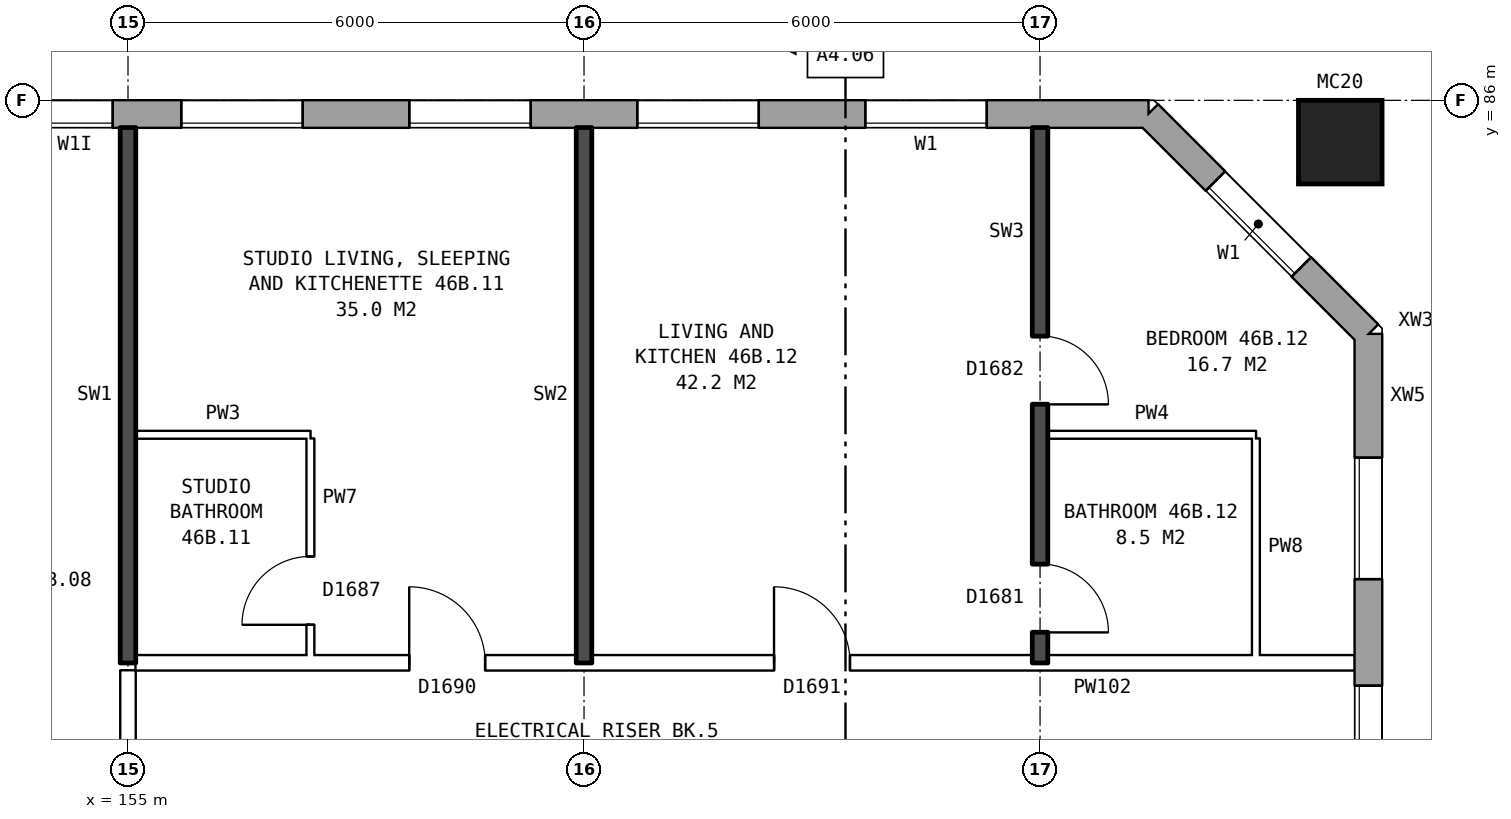
"""IFC4 building model, lengths in metres.
Left out: names, types, materials, properties, quantities, classifications, styles, units other than length and angle.
Written with IfcOpenShell. Run it as: python <this file> out.ifc"""

import sys

from ifc_helpers import new_model, si_unit, direction, frame, frame_2d, origin, origin_2d, place, context, subcontext, project, spatial, rectangle, hollow_rectangle, extrude, element, fill, save


model = new_model("IFC4")
c1 = context("Model", 3, precision=1e-05, world=origin(), true_north=direction((0.0, 1.0)))
c2 = subcontext(c1, "Body", "Model", "MODEL_VIEW")
j1 = project(units=[si_unit("LENGTHUNIT", "METRE"), si_unit("PLANEANGLEUNIT", "RADIAN")], contexts=[c1])
p1 = place(None, origin())
s1 = spatial("IfcSite", under=j1, at=p1, CompositionType="ELEMENT")
p2 = place(p1, origin())
s2 = spatial("IfcBuilding", under=s1, at=p2, CompositionType="ELEMENT")
p3 = place(p2, frame((0.0, 0.0, 164.0)))
s3 = spatial("IfcBuildingStorey", under=s2, at=p3, CompositionType="ELEMENT", Elevation=164.0)
p4 = place(p3, frame((170.95, 85.45, 0.0), z_axis=(0.0, 0.0, 1.0), x_axis=(1.0, 0.0, 0.0)))
e1 = element("IfcColumn", 1, at=p4, inside=s3, PredefinedType="COLUMN", context=c2, shape_type="SweptSolid", body=[
    extrude(hollow_rectangle(XDim=1.1, YDim=1.1, WallThickness=0.06, at=origin_2d()), origin(), (0.0, 0.0, 1.0), 3.1),
])
p5 = place(p3, frame((171.32, 57.075, 0.0), z_axis=(0.0, 0.0, 1.0), x_axis=(0.0, 1.0, 0.0)))
e2 = element("IfcWall", 2, at=p5, inside=s3, PredefinedType="STANDARD", context=c2, shape_type="SweptSolid", body=[
    extrude(rectangle(XDim=25.851, YDim=0.36, at=frame_2d((12.925, 0.0))), origin(), (0.0, 0.0, 1.0), 2.85),
])
p6 = place(p5, frame((1.625, 0.0, 0.8)))
e3 = element("IfcOpeningElement", 3, at=p6, cuts=e2, PredefinedType="OPENING", context=c2, shape_type="SweptSolid", body=[
    extrude(rectangle(XDim=1.6, YDim=1.8, at=frame_2d((0.8, 0.9))), frame((0.0, 0.19, 0.0), z_axis=(0.0, -1.0, 0.0), x_axis=(1.0, 0.0, 0.0)), (0.0, 0.0, 1.0), 0.38),
])
p7 = place(p5, frame((4.625, 0.0, 0.8)))
e4 = element("IfcOpeningElement", 4, at=p7, cuts=e2, PredefinedType="OPENING", context=c2, shape_type="SweptSolid", body=[
    extrude(rectangle(XDim=1.6, YDim=1.8, at=frame_2d((0.8, 0.9))), frame((0.0, 0.19, 0.0), z_axis=(0.0, -1.0, 0.0), x_axis=(1.0, 0.0, 0.0)), (0.0, 0.0, 1.0), 0.38),
])
p8 = place(p5, frame((7.625, 0.0, 0.8)))
e5 = element("IfcOpeningElement", 5, at=p8, cuts=e2, PredefinedType="OPENING", context=c2, shape_type="SweptSolid", body=[
    extrude(rectangle(XDim=1.6, YDim=1.8, at=frame_2d((0.8, 0.9))), frame((0.0, 0.19, 0.0), z_axis=(0.0, -1.0, 0.0), x_axis=(1.0, 0.0, 0.0)), (0.0, 0.0, 1.0), 0.38),
])
p9 = place(p5, frame((10.625, 0.0, 0.8)))
e6 = element("IfcOpeningElement", 6, at=p9, cuts=e2, PredefinedType="OPENING", context=c2, shape_type="SweptSolid", body=[
    extrude(rectangle(XDim=1.6, YDim=1.8, at=frame_2d((0.8, 0.9))), frame((0.0, 0.19, 0.0), z_axis=(0.0, -1.0, 0.0), x_axis=(1.0, 0.0, 0.0)), (0.0, 0.0, 1.0), 0.38),
])
p10 = place(p5, frame((13.625, 0.0, 0.8)))
e7 = element("IfcOpeningElement", 7, at=p10, cuts=e2, PredefinedType="OPENING", context=c2, shape_type="SweptSolid", body=[
    extrude(rectangle(XDim=1.6, YDim=1.8, at=frame_2d((0.8, 0.9))), frame((0.0, 0.19, 0.0), z_axis=(0.0, -1.0, 0.0), x_axis=(1.0, 0.0, 0.0)), (0.0, 0.0, 1.0), 0.38),
])
p11 = place(p5, frame((16.625, 0.0, 0.8)))
e8 = element("IfcOpeningElement", 8, at=p11, cuts=e2, PredefinedType="OPENING", context=c2, shape_type="SweptSolid", body=[
    extrude(rectangle(XDim=1.6, YDim=1.8, at=frame_2d((0.8, 0.9))), frame((0.0, 0.19, 0.0), z_axis=(0.0, -1.0, 0.0), x_axis=(1.0, 0.0, 0.0)), (0.0, 0.0, 1.0), 0.38),
])
p12 = place(p5, frame((19.625, 0.0, 0.8)))
e9 = element("IfcOpeningElement", 9, at=p12, cuts=e2, PredefinedType="OPENING", context=c2, shape_type="SweptSolid", body=[
    extrude(rectangle(XDim=1.6, YDim=1.8, at=frame_2d((0.8, 0.9))), frame((0.0, 0.19, 0.0), z_axis=(0.0, -1.0, 0.0), x_axis=(1.0, 0.0, 0.0)), (0.0, 0.0, 1.0), 0.38),
])
p13 = place(p5, frame((22.625, 0.0, 0.8)))
e10 = element("IfcOpeningElement", 10, at=p13, cuts=e2, PredefinedType="OPENING", context=c2, shape_type="SweptSolid", body=[
    extrude(rectangle(XDim=1.6, YDim=1.8, at=frame_2d((0.8, 0.9))), frame((0.0, 0.19, 0.0), z_axis=(0.0, -1.0, 0.0), x_axis=(1.0, 0.0, 0.0)), (0.0, 0.0, 1.0), 0.38),
])
p14 = place(p3, frame((171.32, 82.925, 0.0), z_axis=(0.0, 0.0, 1.0), x_axis=(-0.707106781187, 0.707106781187, 0.0)))
e11 = element("IfcWall", 11, at=p14, inside=s3, PredefinedType="STANDARD", context=c2, shape_type="SweptSolid", body=[
    extrude(rectangle(XDim=4.094, YDim=0.36, at=frame_2d((2.047, 0.0))), origin(), (0.0, 0.0, 1.0), 2.85),
])
p15 = place(p14, frame((1.247, 0.0, 0.8)))
e12 = element("IfcOpeningElement", 12, at=p15, cuts=e11, PredefinedType="OPENING", context=c2, shape_type="SweptSolid", body=[
    extrude(rectangle(XDim=1.6, YDim=1.8, at=frame_2d((0.8, 0.9))), frame((0.0, 0.19, 0.0), z_axis=(0.0, -1.0, 0.0), x_axis=(1.0, 0.0, 0.0)), (0.0, 0.0, 1.0), 0.38),
])
p16 = place(p3, frame((168.425, 85.82, 0.0), z_axis=(0.0, 0.0, 1.0), x_axis=(-1.0, 0.0, 0.0)))
e13 = element("IfcWall", 13, at=p16, inside=s3, PredefinedType="STANDARD", context=c2, shape_type="SweptSolid", body=[
    extrude(rectangle(XDim=34.351, YDim=0.36, at=frame_2d((17.175, 0.0))), origin(), (0.0, 0.0, 1.0), 2.85),
])
p17 = place(p16, frame((2.125, 0.0, 0.8)))
e14 = element("IfcOpeningElement", 14, at=p17, cuts=e13, PredefinedType="OPENING", context=c2, shape_type="SweptSolid", body=[
    extrude(rectangle(XDim=1.6, YDim=1.8, at=frame_2d((0.8, 0.9))), frame((0.0, 0.19, 0.0), z_axis=(0.0, -1.0, 0.0), x_axis=(1.0, 0.0, 0.0)), (0.0, 0.0, 1.0), 0.38),
])
p18 = place(p16, frame((5.125, 0.0, 0.8)))
e15 = element("IfcOpeningElement", 15, at=p18, cuts=e13, PredefinedType="OPENING", context=c2, shape_type="SweptSolid", body=[
    extrude(rectangle(XDim=1.6, YDim=1.8, at=frame_2d((0.8, 0.9))), frame((0.0, 0.19, 0.0), z_axis=(0.0, -1.0, 0.0), x_axis=(1.0, 0.0, 0.0)), (0.0, 0.0, 1.0), 0.38),
])
p19 = place(p16, frame((8.125, 0.0, 0.8)))
e16 = element("IfcOpeningElement", 16, at=p19, cuts=e13, PredefinedType="OPENING", context=c2, shape_type="SweptSolid", body=[
    extrude(rectangle(XDim=1.6, YDim=1.8, at=frame_2d((0.8, 0.9))), frame((0.0, 0.19, 0.0), z_axis=(0.0, -1.0, 0.0), x_axis=(1.0, 0.0, 0.0)), (0.0, 0.0, 1.0), 0.38),
])
p20 = place(p16, frame((11.125, 0.0, 0.8)))
e17 = element("IfcOpeningElement", 17, at=p20, cuts=e13, PredefinedType="OPENING", context=c2, shape_type="SweptSolid", body=[
    extrude(rectangle(XDim=1.6, YDim=1.8, at=frame_2d((0.8, 0.9))), frame((0.0, 0.19, 0.0), z_axis=(0.0, -1.0, 0.0), x_axis=(1.0, 0.0, 0.0)), (0.0, 0.0, 1.0), 0.38),
])
p21 = place(p16, frame((13.625, 0.0, 0.9)))
e18 = element("IfcOpeningElement", 18, at=p21, cuts=e13, PredefinedType="OPENING", context=c2, shape_type="SweptSolid", body=[
    extrude(rectangle(XDim=1.0, YDim=1.5, at=frame_2d((0.5, 0.75))), frame((0.0, 0.19, 0.0), z_axis=(0.0, -1.0, 0.0), x_axis=(1.0, 0.0, 0.0)), (0.0, 0.0, 1.0), 0.38),
])
p22 = place(p16, frame((16.575, 0.0, 0.25)))
e19 = element("IfcOpeningElement", 19, at=p22, cuts=e13, PredefinedType="OPENING", context=c2, shape_type="SweptSolid", body=[
    extrude(rectangle(XDim=1.4, YDim=1.2, at=frame_2d((0.7, 0.6))), frame((0.0, 0.19, 0.0), z_axis=(0.0, -1.0, 0.0), x_axis=(1.0, 0.0, 0.0)), (0.0, 0.0, 1.0), 0.38),
])
p23 = place(p16, frame((20.125, 0.0, 0.8)))
e20 = element("IfcOpeningElement", 20, at=p23, cuts=e13, PredefinedType="OPENING", context=c2, shape_type="SweptSolid", body=[
    extrude(rectangle(XDim=1.6, YDim=1.8, at=frame_2d((0.8, 0.9))), frame((0.0, 0.19, 0.0), z_axis=(0.0, -1.0, 0.0), x_axis=(1.0, 0.0, 0.0)), (0.0, 0.0, 1.0), 0.38),
])
p24 = place(p16, frame((23.125, 0.0, 0.8)))
e21 = element("IfcOpeningElement", 21, at=p24, cuts=e13, PredefinedType="OPENING", context=c2, shape_type="SweptSolid", body=[
    extrude(rectangle(XDim=1.6, YDim=1.8, at=frame_2d((0.8, 0.9))), frame((0.0, 0.19, 0.0), z_axis=(0.0, -1.0, 0.0), x_axis=(1.0, 0.0, 0.0)), (0.0, 0.0, 1.0), 0.38),
])
p25 = place(p16, frame((26.125, 0.0, 0.8)))
e22 = element("IfcOpeningElement", 22, at=p25, cuts=e13, PredefinedType="OPENING", context=c2, shape_type="SweptSolid", body=[
    extrude(rectangle(XDim=1.6, YDim=1.8, at=frame_2d((0.8, 0.9))), frame((0.0, 0.19, 0.0), z_axis=(0.0, -1.0, 0.0), x_axis=(1.0, 0.0, 0.0)), (0.0, 0.0, 1.0), 0.38),
])
p26 = place(p16, frame((29.125, 0.0, 0.8)))
e23 = element("IfcOpeningElement", 23, at=p26, cuts=e13, PredefinedType="OPENING", context=c2, shape_type="SweptSolid", body=[
    extrude(rectangle(XDim=1.6, YDim=1.8, at=frame_2d((0.8, 0.9))), frame((0.0, 0.19, 0.0), z_axis=(0.0, -1.0, 0.0), x_axis=(1.0, 0.0, 0.0)), (0.0, 0.0, 1.0), 0.38),
])
p27 = place(p16, frame((32.125, 0.0, 0.8)))
e24 = element("IfcOpeningElement", 24, at=p27, cuts=e13, PredefinedType="OPENING", context=c2, shape_type="SweptSolid", body=[
    extrude(rectangle(XDim=1.6, YDim=1.8, at=frame_2d((0.8, 0.9))), frame((0.0, 0.19, 0.0), z_axis=(0.0, -1.0, 0.0), x_axis=(1.0, 0.0, 0.0)), (0.0, 0.0, 1.0), 0.38),
])
p28 = place(p16, frame((14.925, 0.0, 1.7)))
e25 = element("IfcOpeningElement", 25, at=p28, cuts=e13, PredefinedType="OPENING", context=c2, shape_type="SweptSolid", body=[
    extrude(rectangle(XDim=0.6, YDim=0.9, at=frame_2d((0.3, 0.45))), frame((0.0, 0.19, 0.0), z_axis=(0.0, -1.0, 0.0), x_axis=(1.0, 0.0, 0.0)), (0.0, 0.0, 1.0), 0.38),
])
p29 = place(p3, frame((155.1, 78.6, 0.0), z_axis=(0.0, 0.0, 1.0), x_axis=(1.0, 0.0, 0.0)))
e26 = element("IfcWall", 26, at=p29, inside=s3, PredefinedType="PARTITIONING", context=c2, shape_type="SweptSolid", body=[
    extrude(rectangle(XDim=16.04, YDim=0.2, at=frame_2d((8.02, 0.0))), origin(), (0.0, 0.0, 1.0), 2.85),
])
p30 = place(p29, frame((3.6, 0.0, 0.0)))
e27 = element("IfcOpeningElement", 27, at=p30, cuts=e26, PredefinedType="OPENING", context=c2, shape_type="SweptSolid", body=[
    extrude(rectangle(XDim=1.0, YDim=2.1, at=frame_2d((0.5, 1.05))), frame((0.0, 0.11, 0.0), z_axis=(0.0, -1.0, 0.0), x_axis=(1.0, 0.0, 0.0)), (0.0, 0.0, 1.0), 0.22),
])
p31 = place(p29, frame((8.4, 0.0, 0.0)))
e28 = element("IfcOpeningElement", 28, at=p31, cuts=e26, PredefinedType="OPENING", context=c2, shape_type="SweptSolid", body=[
    extrude(rectangle(XDim=1.0, YDim=2.1, at=frame_2d((0.5, 1.05))), frame((0.0, 0.11, 0.0), z_axis=(0.0, -1.0, 0.0), x_axis=(1.0, 0.0, 0.0)), (0.0, 0.0, 1.0), 0.22),
])
p32 = place(p3, frame((155.1, 81.6, 0.0), z_axis=(0.0, 0.0, 1.0), x_axis=(1.0, 0.0, 0.0)))
e29 = element("IfcWall", 29, at=p32, inside=s3, PredefinedType="PARTITIONING", context=c2, shape_type="SweptSolid", body=[
    extrude(rectangle(XDim=2.3, YDim=0.1, at=frame_2d((1.15, 0.0))), origin(), (0.0, 0.0, 1.0), 2.85),
])
p33 = place(p3, frame((167.1, 81.6, 0.0), z_axis=(0.0, 0.0, 1.0), x_axis=(1.0, 0.0, 0.0)))
e30 = element("IfcWall", 30, at=p33, inside=s3, PredefinedType="PARTITIONING", context=c2, shape_type="SweptSolid", body=[
    extrude(rectangle(XDim=2.74, YDim=0.1, at=frame_2d((1.37, 0.0))), origin(), (0.0, 0.0, 1.0), 2.85),
])
p34 = place(p3, frame((155.0, 76.3, 0.0), z_axis=(0.0, 0.0, 1.0), x_axis=(0.0, 1.0, 0.0)))
e31 = element("IfcWall", 31, at=p34, inside=s3, PredefinedType="PARTITIONING", context=c2, shape_type="SweptSolid", body=[
    extrude(rectangle(XDim=2.2, YDim=0.2, at=frame_2d((1.1, 0.0))), origin(), (0.0, 0.0, 1.0), 2.85),
])
p35 = place(p3, frame((155.0, 78.6, 0.0), z_axis=(0.0, 0.0, 1.0), x_axis=(0.0, 1.0, 0.0)))
e32 = element("IfcWall", 32, at=p35, inside=s3, PredefinedType="SOLIDWALL", context=c2, shape_type="SweptSolid", body=[
    extrude(rectangle(XDim=7.04, YDim=0.2, at=frame_2d((3.52, 0.0))), origin(), (0.0, 0.0, 1.0), 2.85),
])
p36 = place(p3, frame((157.4, 78.7, 0.0), z_axis=(0.0, 0.0, 1.0), x_axis=(0.0, 1.0, 0.0)))
e33 = element("IfcWall", 33, at=p36, inside=s3, PredefinedType="PARTITIONING", context=c2, shape_type="SweptSolid", body=[
    extrude(rectangle(XDim=2.85, YDim=0.1, at=frame_2d((1.425, 0.0))), origin(), (0.0, 0.0, 1.0), 2.85),
])
p37 = place(p36, frame((0.4, 0.0, 0.0)))
e34 = element("IfcOpeningElement", 34, at=p37, cuts=e33, PredefinedType="OPENING", context=c2, shape_type="SweptSolid", body=[
    extrude(rectangle(XDim=0.9, YDim=2.1, at=frame_2d((0.45, 1.05))), frame((0.0, 0.06, 0.0), z_axis=(0.0, -1.0, 0.0), x_axis=(1.0, 0.0, 0.0)), (0.0, 0.0, 1.0), 0.12),
])
p38 = place(p3, frame((161.0, 78.6, 0.0), z_axis=(0.0, 0.0, 1.0), x_axis=(0.0, 1.0, 0.0)))
e35 = element("IfcWall", 35, at=p38, inside=s3, PredefinedType="SOLIDWALL", context=c2, shape_type="SweptSolid", body=[
    extrude(rectangle(XDim=7.04, YDim=0.2, at=frame_2d((3.52, 0.0))), origin(), (0.0, 0.0, 1.0), 2.85),
])
p39 = place(p3, frame((167.0, 78.6, 0.0), z_axis=(0.0, 0.0, 1.0), x_axis=(0.0, 1.0, 0.0)))
e36 = element("IfcWall", 36, at=p39, inside=s3, PredefinedType="SOLIDWALL", context=c2, shape_type="SweptSolid", body=[
    extrude(rectangle(XDim=7.04, YDim=0.2, at=frame_2d((3.52, 0.0))), origin(), (0.0, 0.0, 1.0), 2.85),
])
p40 = place(p39, frame((3.4, 0.0, 0.0)))
e37 = element("IfcOpeningElement", 37, at=p40, cuts=e36, PredefinedType="OPENING", context=c2, shape_type="SweptSolid", body=[
    extrude(rectangle(XDim=0.9, YDim=2.1, at=frame_2d((0.45, 1.05))), frame((0.0, 0.11, 0.0), z_axis=(0.0, -1.0, 0.0), x_axis=(1.0, 0.0, 0.0)), (0.0, 0.0, 1.0), 0.22),
])
p41 = place(p39, frame((0.4, 0.0, 0.0)))
e38 = element("IfcOpeningElement", 38, at=p41, cuts=e36, PredefinedType="OPENING", context=c2, shape_type="SweptSolid", body=[
    extrude(rectangle(XDim=0.9, YDim=2.1, at=frame_2d((0.45, 1.05))), frame((0.0, 0.11, 0.0), z_axis=(0.0, -1.0, 0.0), x_axis=(1.0, 0.0, 0.0)), (0.0, 0.0, 1.0), 0.22),
])
p42 = place(p3, frame((169.84, 78.7, 0.0), z_axis=(0.0, 0.0, 1.0), x_axis=(0.0, 1.0, 0.0)))
e39 = element("IfcWall", 39, at=p42, inside=s3, PredefinedType="PARTITIONING", context=c2, shape_type="SweptSolid", body=[
    extrude(rectangle(XDim=2.85, YDim=0.1, at=frame_2d((1.425, 0.0))), origin(), (0.0, 0.0, 1.0), 2.85),
])
p43 = place(p12, origin())
e40 = element("IfcWindow", 40, at=p43, inside=s3, PartitioningType="SINGLE_PANEL", PredefinedType="WINDOW", context=c2, shape_type="SweptSolid", body=[
    extrude(rectangle(XDim=1.6, YDim=1.8, at=frame_2d((0.8, 0.9))), frame((0.0, 0.15, 0.0), z_axis=(0.0, -1.0, 0.0), x_axis=(1.0, 0.0, 0.0)), (0.0, 0.0, 1.0), 0.06),
])
fill(e9, e40)
p44 = place(p13, origin())
e41 = element("IfcWindow", 41, at=p44, inside=s3, PartitioningType="SINGLE_PANEL", PredefinedType="WINDOW", context=c2, shape_type="SweptSolid", body=[
    extrude(rectangle(XDim=1.6, YDim=1.8, at=frame_2d((0.8, 0.9))), frame((0.0, 0.15, 0.0), z_axis=(0.0, -1.0, 0.0), x_axis=(1.0, 0.0, 0.0)), (0.0, 0.0, 1.0), 0.06),
])
fill(e10, e41)
p45 = place(p15, origin())
e42 = element("IfcWindow", 42, at=p45, inside=s3, PartitioningType="SINGLE_PANEL", PredefinedType="WINDOW", context=c2, shape_type="SweptSolid", body=[
    extrude(rectangle(XDim=1.6, YDim=1.8, at=frame_2d((0.8, 0.9))), frame((0.0, 0.15, 0.0), z_axis=(0.0, -1.0, 0.0), x_axis=(1.0, 0.0, 0.0)), (0.0, 0.0, 1.0), 0.06),
])
fill(e12, e42)
p46 = place(p17, origin())
e43 = element("IfcWindow", 43, at=p46, inside=s3, PartitioningType="SINGLE_PANEL", PredefinedType="WINDOW", context=c2, shape_type="SweptSolid", body=[
    extrude(rectangle(XDim=1.6, YDim=1.8, at=frame_2d((0.8, 0.9))), frame((0.0, 0.15, 0.0), z_axis=(0.0, -1.0, 0.0), x_axis=(1.0, 0.0, 0.0)), (0.0, 0.0, 1.0), 0.06),
])
fill(e14, e43)
p47 = place(p18, origin())
e44 = element("IfcWindow", 44, at=p47, inside=s3, PartitioningType="SINGLE_PANEL", PredefinedType="WINDOW", context=c2, shape_type="SweptSolid", body=[
    extrude(rectangle(XDim=1.6, YDim=1.8, at=frame_2d((0.8, 0.9))), frame((0.0, 0.15, 0.0), z_axis=(0.0, -1.0, 0.0), x_axis=(1.0, 0.0, 0.0)), (0.0, 0.0, 1.0), 0.06),
])
fill(e15, e44)
p48 = place(p19, origin())
e45 = element("IfcWindow", 45, at=p48, inside=s3, PartitioningType="SINGLE_PANEL", PredefinedType="WINDOW", context=c2, shape_type="SweptSolid", body=[
    extrude(rectangle(XDim=1.6, YDim=1.8, at=frame_2d((0.8, 0.9))), frame((0.0, 0.15, 0.0), z_axis=(0.0, -1.0, 0.0), x_axis=(1.0, 0.0, 0.0)), (0.0, 0.0, 1.0), 0.06),
])
fill(e16, e45)
p49 = place(p20, origin())
e46 = element("IfcWindow", 46, at=p49, inside=s3, PartitioningType="SINGLE_PANEL", PredefinedType="WINDOW", context=c2, shape_type="SweptSolid", body=[
    extrude(rectangle(XDim=1.6, YDim=1.8, at=frame_2d((0.8, 0.9))), frame((0.0, 0.15, 0.0), z_axis=(0.0, -1.0, 0.0), x_axis=(1.0, 0.0, 0.0)), (0.0, 0.0, 1.0), 0.06),
])
fill(e17, e46)
p50 = place(p21, origin())
e47 = element("IfcWindow", 47, at=p50, inside=s3, PartitioningType="SINGLE_PANEL", PredefinedType="WINDOW", context=c2, shape_type="SweptSolid", body=[
    extrude(rectangle(XDim=1.0, YDim=1.5, at=frame_2d((0.5, 0.75))), frame((0.0, 0.15, 0.0), z_axis=(0.0, -1.0, 0.0), x_axis=(1.0, 0.0, 0.0)), (0.0, 0.0, 1.0), 0.06),
])
fill(e18, e47)
p51 = place(p30, origin())
e48 = element("IfcDoor", 48, at=p51, inside=s3, OperationType="SINGLE_SWING_LEFT", PredefinedType="DOOR", context=c2, shape_type="SweptSolid", body=[
    extrude(rectangle(XDim=1.0, YDim=2.1, at=frame_2d((0.5, 1.05))), frame((0.0, 0.025, 0.0), z_axis=(0.0, -1.0, 0.0), x_axis=(1.0, 0.0, 0.0)), (0.0, 0.0, 1.0), 0.05),
])
fill(e27, e48)
p52 = place(p37, origin())
e49 = element("IfcDoor", 49, at=p52, inside=s3, OperationType="SINGLE_SWING_LEFT", PredefinedType="DOOR", context=c2, shape_type="SweptSolid", body=[
    extrude(rectangle(XDim=0.9, YDim=2.1, at=frame_2d((0.45, 1.05))), frame((0.0, 0.025, 0.0), z_axis=(0.0, -1.0, 0.0), x_axis=(1.0, 0.0, 0.0)), (0.0, 0.0, 1.0), 0.05),
])
fill(e34, e49)
p53 = place(p40, frame((0.9, 0.0, 0.0), z_axis=(0.0, 0.0, 1.0), x_axis=(-1.0, 0.0, 0.0)))
e50 = element("IfcDoor", 50, at=p53, inside=s3, OperationType="SINGLE_SWING_RIGHT", PredefinedType="DOOR", context=c2, shape_type="SweptSolid", body=[
    extrude(rectangle(XDim=0.9, YDim=2.1, at=frame_2d((0.45, 1.05))), frame((0.0, 0.025, 0.0), z_axis=(0.0, -1.0, 0.0), x_axis=(1.0, 0.0, 0.0)), (0.0, 0.0, 1.0), 0.05),
])
fill(e37, e50)
p54 = place(p31, origin())
e51 = element("IfcDoor", 51, at=p54, inside=s3, OperationType="SINGLE_SWING_LEFT", PredefinedType="DOOR", context=c2, shape_type="SweptSolid", body=[
    extrude(rectangle(XDim=1.0, YDim=2.1, at=frame_2d((0.5, 1.05))), frame((0.0, 0.025, 0.0), z_axis=(0.0, -1.0, 0.0), x_axis=(1.0, 0.0, 0.0)), (0.0, 0.0, 1.0), 0.05),
])
fill(e28, e51)
p55 = place(p41, frame((0.9, 0.0, 0.0), z_axis=(0.0, 0.0, 1.0), x_axis=(-1.0, 0.0, 0.0)))
e52 = element("IfcDoor", 52, at=p55, inside=s3, OperationType="SINGLE_SWING_RIGHT", PredefinedType="DOOR", context=c2, shape_type="SweptSolid", body=[
    extrude(rectangle(XDim=0.9, YDim=2.1, at=frame_2d((0.45, 1.05))), frame((0.0, 0.025, 0.0), z_axis=(0.0, -1.0, 0.0), x_axis=(1.0, 0.0, 0.0)), (0.0, 0.0, 1.0), 0.05),
])
fill(e38, e52)
save(model, sys.argv[1])
